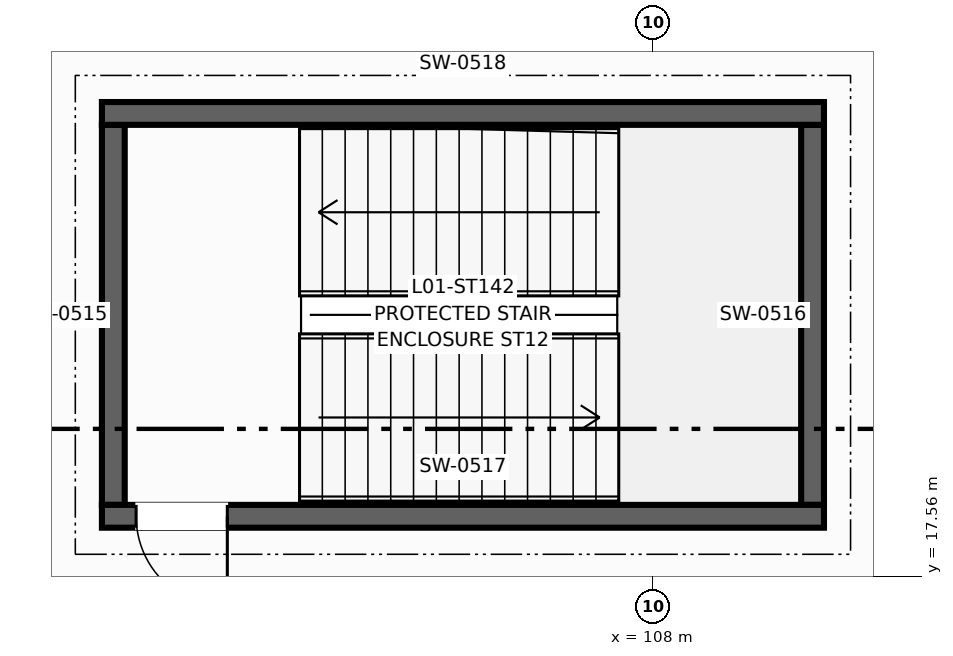
"""IFC4 building model, lengths in metres.
Left out: names, types, materials, properties, quantities, classifications, styles, units other than length and angle.
Written with IfcOpenShell. Run it as: python <this file> out.ifc"""

import sys

from ifc_helpers import new_model, si_unit, direction, frame, frame_2d, origin, place, context, subcontext, project, spatial, rectangle, extrude, element, fill, save


model = new_model("IFC4")
c1 = context("Model", 3, precision=1e-05, world=origin(), true_north=direction((0.0, 1.0)))
c2 = subcontext(c1, "Body", "Model", "MODEL_VIEW")
j1 = project(units=[si_unit("LENGTHUNIT", "METRE"), si_unit("PLANEANGLEUNIT", "RADIAN")], contexts=[c1])
p1 = place(None, origin())
s1 = spatial("IfcSite", under=j1, at=p1, CompositionType="ELEMENT")
p2 = place(p1, origin())
s2 = spatial("IfcBuilding", under=s1, at=p2, CompositionType="ELEMENT")
p3 = place(p2, frame((0.0, 0.0, 4.5)))
s3 = spatial("IfcBuildingStorey", under=s2, at=p3, CompositionType="ELEMENT", Elevation=4.5)
for number, where, z_axis, x_axis in (
    (1, (100.9, 18.5, 0.0), (0.0, 0.0, 1.0), (0.0, 1.0, 0.0)),
    (2, (110.1, 18.5, 0.0), (0.0, 0.0, 1.0), (0.0, 1.0, 0.0)),
):
    element("IfcWall", number, at=place(p3, frame(where, z_axis=z_axis, x_axis=x_axis)), inside=s3, PredefinedType="SHEAR", context=c2, shape_type="SweptSolid", body=[
        extrude(rectangle(XDim=5.0, YDim=0.3, at=frame_2d((2.5, 0.0))), origin(), (0.0, 0.0, 1.0), 4.25),
    ])
p4 = place(p3, frame((100.75, 18.35, 0.0), z_axis=(0.0, 0.0, 1.0), x_axis=(1.0, 0.0, 0.0)))
e3 = element("IfcWall", 3, at=p4, inside=s3, PredefinedType="SHEAR", context=c2, shape_type="SweptSolid", body=[
    extrude(rectangle(XDim=9.5, YDim=0.3, at=frame_2d((4.75, 0.0))), origin(), (0.0, 0.0, 1.0), 4.25),
])
p5 = place(p4, frame((0.45, 0.0, 0.0)))
e4 = element("IfcOpeningElement", 4, at=p5, cuts=e3, PredefinedType="OPENING", context=c2, shape_type="SweptSolid", body=[
    extrude(rectangle(XDim=1.2, YDim=2.2, at=frame_2d((0.6, 1.1))), frame((0.0, 0.16, 0.0), z_axis=(0.0, -1.0, 0.0), x_axis=(1.0, 0.0, 0.0)), (0.0, 0.0, 1.0), 0.32),
])
p6 = place(p3, frame((100.75, 23.65, 0.0), z_axis=(0.0, 0.0, 1.0), x_axis=(1.0, 0.0, 0.0)))
e5 = element("IfcWall", 5, at=p6, inside=s3, PredefinedType="SHEAR", context=c2, shape_type="SweptSolid", body=[
    extrude(rectangle(XDim=9.5, YDim=0.3, at=frame_2d((4.75, 0.0))), origin(), (0.0, 0.0, 1.0), 4.25),
])
p7 = place(p5, frame((1.2, 0.0, 0.0), z_axis=(0.0, 0.0, 1.0), x_axis=(-1.0, 0.0, 0.0)))
e6 = element("IfcDoor", 6, at=p7, inside=s3, OperationType="SINGLE_SWING_RIGHT", PredefinedType="DOOR", context=c2, shape_type="SweptSolid", body=[
    extrude(rectangle(XDim=1.2, YDim=2.2, at=frame_2d((0.6, 1.1))), frame((0.0, 0.025, 0.0), z_axis=(0.0, -1.0, 0.0), x_axis=(1.0, 0.0, 0.0)), (0.0, 0.0, 1.0), 0.05),
])
fill(e4, e6)
save(model, sys.argv[1])
